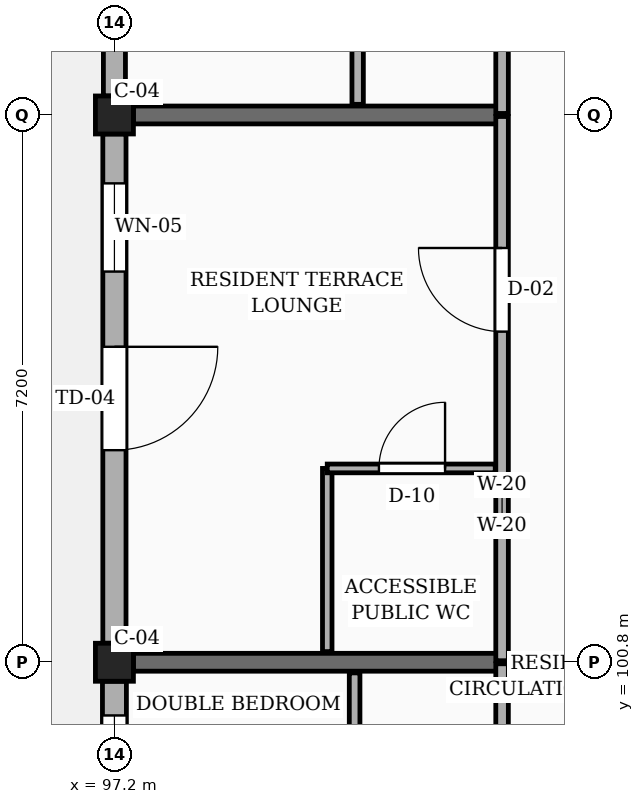
"""IFC4 building model, lengths in metres.
Left out: names, types, materials, properties, quantities, classifications, styles, units other than length and angle.
Written with IfcOpenShell. Run it as: python <this file> out.ifc"""

import sys

from ifc_helpers import new_model, si_unit, direction, frame, frame_2d, origin, origin_2d, place, context, subcontext, project, spatial, rectangle, extrude, element, fill, save


model = new_model("IFC4")
c1 = context("Model", 3, precision=1e-05, world=origin(), true_north=direction((0.0, 1.0)))
c2 = subcontext(c1, "Body", "Model", "MODEL_VIEW")
j1 = project(units=[si_unit("LENGTHUNIT", "METRE"), si_unit("PLANEANGLEUNIT", "RADIAN")], contexts=[c1])
p1 = place(None, origin())
s1 = spatial("IfcSite", under=j1, at=p1, CompositionType="ELEMENT")
p2 = place(p1, origin())
s2 = spatial("IfcBuilding", under=s1, at=p2, CompositionType="ELEMENT")
p3 = place(p2, frame((0.0, 0.0, 23.4)))
s3 = spatial("IfcBuildingStorey", under=s2, at=p3, CompositionType="ELEMENT", Elevation=23.4)
for number, where, z_axis, x_axis in (
    (1, (97.2, 100.8, 0.0), (0.0, 0.0, 1.0), (1.0, 0.0, 0.0)),
    (2, (97.2, 108.0, 0.0), (0.0, 0.0, 1.0), (1.0, 0.0, 0.0)),
):
    element("IfcColumn", number, at=place(p3, frame(where, z_axis=z_axis, x_axis=x_axis)), inside=s3, PredefinedType="COLUMN", context=c2, shape_type="SweptSolid", body=[
        extrude(rectangle(XDim=0.5, YDim=0.5, at=origin_2d()), origin(), (0.0, 0.0, 1.0), 3.15),
    ])
for number, where, z_axis, x_axis in (
    (3, (97.45, 100.8, 0.0), (0.0, 0.0, 1.0), (1.0, 0.0, 0.0)),
    (4, (97.45, 108.0, 0.0), (0.0, 0.0, 1.0), (1.0, 0.0, 0.0)),
):
    element("IfcWall", number, at=place(p3, frame(where, z_axis=z_axis, x_axis=x_axis)), inside=s3, PredefinedType="SOLIDWALL", context=c2, shape_type="SweptSolid", body=[
        extrude(rectangle(XDim=4.85, YDim=0.235, at=frame_2d((2.425, 0.0))), origin(), (0.0, 0.0, 1.0), 2.19),
    ])
p4 = place(p3, frame((97.2, 114.95, 0.0), z_axis=(0.0, 0.0, 1.0), x_axis=(0.0, -1.0, 0.0)))
e5 = element("IfcWall", 5, at=p4, inside=s3, PredefinedType="SOLIDWALL", context=c2, shape_type="SweptSolid", body=[
    extrude(rectangle(XDim=6.7, YDim=0.29, at=frame_2d((3.35, 0.0))), origin(), (0.0, 0.0, 1.0), 2.46),
])
p5 = place(p4, frame((0.45, 0.0, 0.78)))
e6 = element("IfcOpeningElement", 6, at=p5, cuts=e5, PredefinedType="OPENING", context=c2, shape_type="SweptSolid", body=[
    extrude(rectangle(XDim=0.98, YDim=1.36, at=frame_2d((0.49, 0.68))), frame((0.0, 0.155, 0.0), z_axis=(0.0, -1.0, 0.0), x_axis=(1.0, 0.0, 0.0)), (0.0, 0.0, 1.0), 0.31),
])
p6 = place(p4, frame((4.65, 0.0, 0.78)))
e7 = element("IfcOpeningElement", 7, at=p6, cuts=e5, PredefinedType="OPENING", context=c2, shape_type="SweptSolid", body=[
    extrude(rectangle(XDim=1.14, YDim=1.36, at=frame_2d((0.57, 0.68))), frame((0.0, 0.155, 0.0), z_axis=(0.0, -1.0, 0.0), x_axis=(1.0, 0.0, 0.0)), (0.0, 0.0, 1.0), 0.31),
])
p7 = place(p3, frame((97.2, 107.75, 0.0), z_axis=(0.0, 0.0, 1.0), x_axis=(0.0, -1.0, 0.0)))
e8 = element("IfcWall", 8, at=p7, inside=s3, PredefinedType="SOLIDWALL", context=c2, shape_type="SweptSolid", body=[
    extrude(rectangle(XDim=6.7, YDim=0.305, at=frame_2d((3.35, 0.0))), origin(), (0.0, 0.0, 1.0), 2.46),
])
p8 = place(p7, frame((2.8, 0.0, 0.0)))
e9 = element("IfcOpeningElement", 9, at=p8, cuts=e8, PredefinedType="OPENING", context=c2, shape_type="SweptSolid", body=[
    extrude(rectangle(XDim=1.36, YDim=2.12, at=frame_2d((0.68, 1.06))), frame((0.0, 0.163, 0.0), z_axis=(0.0, -1.0, 0.0), x_axis=(1.0, 0.0, 0.0)), (0.0, 0.0, 1.0), 0.325),
])
p9 = place(p7, frame((0.65, 0.0, 0.78)))
e10 = element("IfcOpeningElement", 10, at=p9, cuts=e8, PredefinedType="OPENING", context=c2, shape_type="SweptSolid", body=[
    extrude(rectangle(XDim=1.16, YDim=1.15, at=frame_2d((0.58, 0.575))), frame((0.0, 0.163, 0.0), z_axis=(0.0, -1.0, 0.0), x_axis=(1.0, 0.0, 0.0)), (0.0, 0.0, 1.0), 0.325),
])
p10 = place(p3, frame((97.2, 100.55, 0.0), z_axis=(0.0, 0.0, 1.0), x_axis=(0.0, -1.0, 0.0)))
e11 = element("IfcWall", 11, at=p10, inside=s3, PredefinedType="SOLIDWALL", context=c2, shape_type="SweptSolid", body=[
    extrude(rectangle(XDim=6.7, YDim=0.315, at=frame_2d((3.35, 0.0))), origin(), (0.0, 0.0, 1.0), 2.46),
])
p11 = place(p10, frame((0.45, 0.0, 0.78)))
e12 = element("IfcOpeningElement", 12, at=p11, cuts=e11, PredefinedType="OPENING", context=c2, shape_type="SweptSolid", body=[
    extrude(rectangle(XDim=1.22, YDim=1.36, at=frame_2d((0.61, 0.68))), frame((0.0, 0.167, 0.0), z_axis=(0.0, -1.0, 0.0), x_axis=(1.0, 0.0, 0.0)), (0.0, 0.0, 1.0), 0.335),
])
p12 = place(p10, frame((4.65, 0.0, 0.78)))
e13 = element("IfcOpeningElement", 13, at=p12, cuts=e11, PredefinedType="OPENING", context=c2, shape_type="SweptSolid", body=[
    extrude(rectangle(XDim=1.38, YDim=1.36, at=frame_2d((0.69, 0.68))), frame((0.0, 0.167, 0.0), z_axis=(0.0, -1.0, 0.0), x_axis=(1.0, 0.0, 0.0)), (0.0, 0.0, 1.0), 0.335),
])
p13 = place(p3, frame((102.3, 93.62, 0.0), z_axis=(0.0, 0.0, 1.0), x_axis=(0.0, 1.0, 0.0)))
e14 = element("IfcWall", 14, at=p13, inside=s3, PredefinedType="PARTITIONING", context=c2, shape_type="SweptSolid", body=[
    extrude(rectangle(XDim=7.16, YDim=0.165, at=frame_2d((3.58, 0.0))), origin(), (0.0, 0.0, 1.0), 2.325),
])
p14 = place(p13, frame((1.33, 0.0, 0.0)))
e15 = element("IfcOpeningElement", 15, at=p14, cuts=e14, PredefinedType="OPENING", context=c2, shape_type="SweptSolid", body=[
    extrude(rectangle(XDim=1.14, YDim=2.18, at=frame_2d((0.57, 1.09))), frame((0.0, 0.093, 0.0), z_axis=(0.0, -1.0, 0.0), x_axis=(1.0, 0.0, 0.0)), (0.0, 0.0, 1.0), 0.185),
])
p15 = place(p3, frame((102.3, 100.82, 0.0), z_axis=(0.0, 0.0, 1.0), x_axis=(0.0, 1.0, 0.0)))
e16 = element("IfcWall", 16, at=p15, inside=s3, PredefinedType="PARTITIONING", context=c2, shape_type="SweptSolid", body=[
    extrude(rectangle(XDim=7.16, YDim=0.165, at=frame_2d((3.58, 0.0))), origin(), (0.0, 0.0, 1.0), 2.325),
])
p16 = place(p15, frame((4.33, 0.0, 0.0)))
e17 = element("IfcOpeningElement", 17, at=p16, cuts=e16, PredefinedType="OPENING", context=c2, shape_type="SweptSolid", body=[
    extrude(rectangle(XDim=1.1, YDim=2.15, at=frame_2d((0.55, 1.075))), frame((0.0, 0.093, 0.0), z_axis=(0.0, -1.0, 0.0), x_axis=(1.0, 0.0, 0.0)), (0.0, 0.0, 1.0), 0.185),
])
p17 = place(p3, frame((102.3, 108.02, 0.0), z_axis=(0.0, 0.0, 1.0), x_axis=(0.0, 1.0, 0.0)))
e18 = element("IfcWall", 18, at=p17, inside=s3, PredefinedType="PARTITIONING", context=c2, shape_type="SweptSolid", body=[
    extrude(rectangle(XDim=7.16, YDim=0.165, at=frame_2d((3.58, 0.0))), origin(), (0.0, 0.0, 1.0), 2.325),
])
p18 = place(p17, frame((4.78, 0.0, 0.0)))
e19 = element("IfcOpeningElement", 19, at=p18, cuts=e18, PredefinedType="OPENING", context=c2, shape_type="SweptSolid", body=[
    extrude(rectangle(XDim=0.94, YDim=2.12, at=frame_2d((0.47, 1.06))), frame((0.0, 0.093, 0.0), z_axis=(0.0, -1.0, 0.0), x_axis=(1.0, 0.0, 0.0)), (0.0, 0.0, 1.0), 0.185),
])
p19 = place(p3, frame((100.36, 93.74, 0.0), z_axis=(0.0, 0.0, 1.0), x_axis=(0.0, 1.0, 0.0)))
e20 = element("IfcWall", 20, at=p19, inside=s3, PredefinedType="PARTITIONING", context=c2, shape_type="SweptSolid", body=[
    extrude(rectangle(XDim=6.92, YDim=0.14, at=frame_2d((3.46, 0.0))), origin(), (0.0, 0.0, 1.0), 2.325),
])
p20 = place(p19, frame((1.31, 0.0, 0.0)))
e21 = element("IfcOpeningElement", 21, at=p20, cuts=e20, PredefinedType="OPENING", context=c2, shape_type="SweptSolid", body=[
    extrude(rectangle(XDim=0.92, YDim=2.1, at=frame_2d((0.46, 1.05))), frame((0.0, 0.08, 0.0), z_axis=(0.0, -1.0, 0.0), x_axis=(1.0, 0.0, 0.0)), (0.0, 0.0, 1.0), 0.16),
])
p21 = place(p3, frame((100.0, 100.94, 0.0), z_axis=(0.0, 0.0, 1.0), x_axis=(0.0, 1.0, 0.0)))
e22 = element("IfcWall", 22, at=p21, inside=s3, PredefinedType="PARTITIONING", context=c2, shape_type="SweptSolid", body=[
    extrude(rectangle(XDim=2.41, YDim=0.125, at=frame_2d((1.205, 0.0))), origin(), (0.0, 0.0, 1.0), 2.325),
])
p22 = place(p3, frame((100.0, 103.35, 0.0), z_axis=(0.0, 0.0, 1.0), x_axis=(1.0, 0.0, 0.0)))
e23 = element("IfcWall", 23, at=p22, inside=s3, PredefinedType="PARTITIONING", context=c2, shape_type="SweptSolid", body=[
    extrude(rectangle(XDim=2.21, YDim=0.115, at=frame_2d((1.105, 0.0))), origin(), (0.0, 0.0, 1.0), 2.325),
])
p23 = place(p22, frame((0.68, 0.0, 0.0)))
e24 = element("IfcOpeningElement", 24, at=p23, cuts=e23, PredefinedType="OPENING", context=c2, shape_type="SweptSolid", body=[
    extrude(rectangle(XDim=0.87, YDim=2.05, at=frame_2d((0.435, 1.025))), frame((0.0, 0.067, 0.0), z_axis=(0.0, -1.0, 0.0), x_axis=(1.0, 0.0, 0.0)), (0.0, 0.0, 1.0), 0.135),
])
p24 = place(p3, frame((100.4, 108.14, 0.0), z_axis=(0.0, 0.0, 1.0), x_axis=(0.0, 1.0, 0.0)))
e25 = element("IfcWall", 25, at=p24, inside=s3, PredefinedType="PARTITIONING", context=c2, shape_type="SweptSolid", body=[
    extrude(rectangle(XDim=6.92, YDim=0.15, at=frame_2d((3.46, 0.0))), origin(), (0.0, 0.0, 1.0), 2.325),
])
p25 = place(p24, frame((4.66, 0.0, 0.0)))
e26 = element("IfcOpeningElement", 26, at=p25, cuts=e25, PredefinedType="OPENING", context=c2, shape_type="SweptSolid", body=[
    extrude(rectangle(XDim=0.92, YDim=2.1, at=frame_2d((0.46, 1.05))), frame((0.0, 0.085, 0.0), z_axis=(0.0, -1.0, 0.0), x_axis=(1.0, 0.0, 0.0)), (0.0, 0.0, 1.0), 0.17),
])
p26 = place(p8, frame((1.36, 0.0, 0.0), z_axis=(0.0, 0.0, 1.0), x_axis=(-1.0, 0.0, 0.0)))
e27 = element("IfcDoor", 27, at=p26, inside=s3, OperationType="SINGLE_SWING_LEFT", PredefinedType="DOOR", context=c2, shape_type="SweptSolid", body=[
    extrude(rectangle(XDim=1.36, YDim=2.12, at=frame_2d((0.68, 1.06))), frame((0.0, 0.025, 0.0), z_axis=(0.0, -1.0, 0.0), x_axis=(1.0, 0.0, 0.0)), (0.0, 0.0, 1.0), 0.05),
])
fill(e9, e27)
p27 = place(p9, origin())
e28 = element("IfcWindow", 28, at=p27, inside=s3, PartitioningType="SINGLE_PANEL", PredefinedType="WINDOW", context=c2, shape_type="SweptSolid", body=[
    extrude(rectangle(XDim=1.16, YDim=1.15, at=frame_2d((0.58, 0.575))), frame((0.0, 0.03, 0.0), z_axis=(0.0, -1.0, 0.0), x_axis=(1.0, 0.0, 0.0)), (0.0, 0.0, 1.0), 0.06),
])
fill(e10, e28)
p28 = place(p11, origin())
e29 = element("IfcWindow", 29, at=p28, inside=s3, PartitioningType="SINGLE_PANEL", PredefinedType="WINDOW", context=c2, shape_type="SweptSolid", body=[
    extrude(rectangle(XDim=1.22, YDim=1.36, at=frame_2d((0.61, 0.68))), frame((0.0, 0.03, 0.0), z_axis=(0.0, -1.0, 0.0), x_axis=(1.0, 0.0, 0.0)), (0.0, 0.0, 1.0), 0.06),
])
fill(e12, e29)
p29 = place(p16, origin())
e30 = element("IfcDoor", 30, at=p29, inside=s3, OperationType="SINGLE_SWING_RIGHT", PredefinedType="DOOR", context=c2, shape_type="SweptSolid", body=[
    extrude(rectangle(XDim=1.1, YDim=2.15, at=frame_2d((0.55, 1.075))), frame((0.0, 0.025, 0.0), z_axis=(0.0, -1.0, 0.0), x_axis=(1.0, 0.0, 0.0)), (0.0, 0.0, 1.0), 0.05),
])
fill(e17, e30)
p30 = place(p23, origin())
e31 = element("IfcDoor", 31, at=p30, inside=s3, OperationType="SINGLE_SWING_RIGHT", PredefinedType="DOOR", context=c2, shape_type="SweptSolid", body=[
    extrude(rectangle(XDim=0.87, YDim=2.05, at=frame_2d((0.435, 1.025))), frame((0.0, 0.025, 0.0), z_axis=(0.0, -1.0, 0.0), x_axis=(1.0, 0.0, 0.0)), (0.0, 0.0, 1.0), 0.05),
])
fill(e24, e31)
save(model, sys.argv[1])
